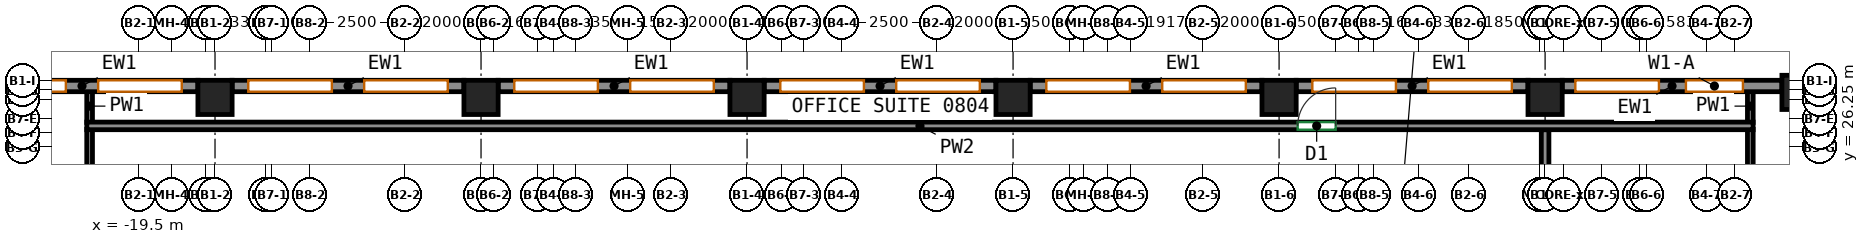
"""IFC4 building model, lengths in metres.
Left out: names, types, materials, properties, quantities, classifications, styles, units other than length and angle.
Written with IfcOpenShell. Run it as: python <this file> out.ifc"""

import sys

from ifc_helpers import new_model, si_unit, direction, frame, frame_2d, origin, origin_2d, place, context, subcontext, project, spatial, rectangle, extrude, source, transform, mapped, element, fill, save


model = new_model("IFC4")
c1 = context("Model", 3, precision=1e-05, world=origin(), true_north=direction((0.0, 1.0)))
c2 = subcontext(c1, "Body", "Model", "MODEL_VIEW")
j1 = project(units=[si_unit("LENGTHUNIT", "METRE"), si_unit("PLANEANGLEUNIT", "RADIAN")], contexts=[c1])
p1 = place(None, origin())
s1 = spatial("IfcSite", under=j1, at=p1, CompositionType="ELEMENT")
p2 = place(p1, origin())
s2 = spatial("IfcBuilding", under=s1, at=p2, CompositionType="ELEMENT")
p3 = place(p2, frame((0.0, 0.0, 39.0)))
s3 = spatial("IfcBuildingStorey", under=s2, at=p3, CompositionType="ELEMENT", Elevation=39.0)
m1 = source(origin(), c2, "Body", "SweptSolid", [
    extrude(rectangle(XDim=0.9, YDim=0.9, at=origin_2d()), origin(), (0.0, 0.0, 1.0), 3.72),
])
for number, where, z_axis, x_axis in (
    (1, (-17.5, 27.55, 0.0), (0.0, 0.0, 1.0), (1.0, 0.0, 0.0)),
    (2, (-10.5, 27.55, 0.0), (0.0, 0.0, 1.0), (1.0, 0.0, 0.0)),
    (3, (-3.5, 27.55, 0.0), (0.0, 0.0, 1.0), (1.0, 0.0, 0.0)),
    (4, (3.5, 27.55, 0.0), (0.0, 0.0, 1.0), (1.0, 0.0, 0.0)),
    (5, (10.5, 27.55, 0.0), (0.0, 0.0, 1.0), (1.0, 0.0, 0.0)),
    (6, (17.5, 27.55, 0.0), (0.0, 0.0, 1.0), (1.0, 0.0, 0.0)),
    (7, (24.182, 27.682, 0.0), (0.0, 0.0, 1.0), (1.0, 0.0, 0.0)),
):
    element("IfcColumn", number, at=place(p3, frame(where, z_axis=z_axis, x_axis=x_axis)), inside=s3, PredefinedType="COLUMN", context=c2, shape_type="MappedRepresentation", body=[
        mapped(m1, transform((0.0, 0.0, 0.0))),
    ])
m2 = source(origin(), c2, "Body", "SweptSolid", [
    extrude(rectangle(XDim=5.782, YDim=0.3, at=frame_2d((2.891, 0.0))), origin(), (0.0, 0.0, 1.0), 3.72),
])
p4 = place(p3, frame((23.732, 27.85, 0.0), z_axis=(0.0, 0.0, 1.0), x_axis=(-1.0, 0.0, 0.0)))
e8 = element("IfcWall", 8, at=p4, inside=s3, PredefinedType="SOLIDWALL", context=c2, shape_type="MappedRepresentation", body=[
    mapped(m2, transform((0.0, 0.0, 0.0))),
])
p5 = place(p4, frame((1.026, 0.0, 0.7)))
e9 = element("IfcOpeningElement", 9, at=p5, cuts=e8, PredefinedType="OPENING", context=c2, shape_type="SweptSolid", body=[
    extrude(rectangle(XDim=1.5, YDim=2.25, at=frame_2d((0.75, 1.125))), frame((0.0, 0.16, 0.0), z_axis=(0.0, -1.0, 0.0), x_axis=(1.0, 0.0, 0.0)), (0.0, 0.0, 1.0), 0.32),
])
p6 = place(p4, frame((3.236, 0.0, 0.7)))
e10 = element("IfcOpeningElement", 10, at=p6, cuts=e8, PredefinedType="OPENING", context=c2, shape_type="SweptSolid", body=[
    extrude(rectangle(XDim=2.2, YDim=2.25, at=frame_2d((1.1, 1.125))), frame((0.0, 0.16, 0.0), z_axis=(0.0, -1.0, 0.0), x_axis=(1.0, 0.0, 0.0)), (0.0, 0.0, 1.0), 0.32),
])
m3 = source(origin(), c2, "Body", "SweptSolid", [
    extrude(rectangle(XDim=6.1, YDim=0.3, at=frame_2d((3.05, 0.0))), origin(), (0.0, 0.0, 1.0), 3.72),
])
p7 = place(p3, frame((17.05, 27.85, 0.0), z_axis=(0.0, 0.0, 1.0), x_axis=(-1.0, 0.0, 0.0)))
e11 = element("IfcWall", 11, at=p7, inside=s3, PredefinedType="SOLIDWALL", context=c2, shape_type="MappedRepresentation", body=[
    mapped(m3, transform((0.0, 0.0, 0.0))),
])
p8 = place(p7, frame((0.425, 0.0, 0.7)))
e12 = element("IfcOpeningElement", 12, at=p8, cuts=e11, PredefinedType="OPENING", context=c2, shape_type="SweptSolid", body=[
    extrude(rectangle(XDim=2.2, YDim=2.25, at=frame_2d((1.1, 1.125))), frame((0.0, 0.16, 0.0), z_axis=(0.0, -1.0, 0.0), x_axis=(1.0, 0.0, 0.0)), (0.0, 0.0, 1.0), 0.32),
])
p9 = place(p7, frame((3.475, 0.0, 0.7)))
e13 = element("IfcOpeningElement", 13, at=p9, cuts=e11, PredefinedType="OPENING", context=c2, shape_type="SweptSolid", body=[
    extrude(rectangle(XDim=2.2, YDim=2.25, at=frame_2d((1.1, 1.125))), frame((0.0, 0.16, 0.0), z_axis=(0.0, -1.0, 0.0), x_axis=(1.0, 0.0, 0.0)), (0.0, 0.0, 1.0), 0.32),
])
p10 = place(p3, frame((10.05, 27.85, 0.0), z_axis=(0.0, 0.0, 1.0), x_axis=(-1.0, 0.0, 0.0)))
e14 = element("IfcWall", 14, at=p10, inside=s3, PredefinedType="SOLIDWALL", context=c2, shape_type="MappedRepresentation", body=[
    mapped(m3, transform((0.0, 0.0, 0.0))),
])
p11 = place(p10, frame((0.425, 0.0, 0.7)))
e15 = element("IfcOpeningElement", 15, at=p11, cuts=e14, PredefinedType="OPENING", context=c2, shape_type="SweptSolid", body=[
    extrude(rectangle(XDim=2.2, YDim=2.25, at=frame_2d((1.1, 1.125))), frame((0.0, 0.16, 0.0), z_axis=(0.0, -1.0, 0.0), x_axis=(1.0, 0.0, 0.0)), (0.0, 0.0, 1.0), 0.32),
])
p12 = place(p10, frame((3.475, 0.0, 0.7)))
e16 = element("IfcOpeningElement", 16, at=p12, cuts=e14, PredefinedType="OPENING", context=c2, shape_type="SweptSolid", body=[
    extrude(rectangle(XDim=2.2, YDim=2.25, at=frame_2d((1.1, 1.125))), frame((0.0, 0.16, 0.0), z_axis=(0.0, -1.0, 0.0), x_axis=(1.0, 0.0, 0.0)), (0.0, 0.0, 1.0), 0.32),
])
p13 = place(p3, frame((3.05, 27.85, 0.0), z_axis=(0.0, 0.0, 1.0), x_axis=(-1.0, 0.0, 0.0)))
e17 = element("IfcWall", 17, at=p13, inside=s3, PredefinedType="SOLIDWALL", context=c2, shape_type="MappedRepresentation", body=[
    mapped(m3, transform((0.0, 0.0, 0.0))),
])
p14 = place(p13, frame((0.425, 0.0, 0.7)))
e18 = element("IfcOpeningElement", 18, at=p14, cuts=e17, PredefinedType="OPENING", context=c2, shape_type="SweptSolid", body=[
    extrude(rectangle(XDim=2.2, YDim=2.25, at=frame_2d((1.1, 1.125))), frame((0.0, 0.16, 0.0), z_axis=(0.0, -1.0, 0.0), x_axis=(1.0, 0.0, 0.0)), (0.0, 0.0, 1.0), 0.32),
])
p15 = place(p13, frame((3.475, 0.0, 0.7)))
e19 = element("IfcOpeningElement", 19, at=p15, cuts=e17, PredefinedType="OPENING", context=c2, shape_type="SweptSolid", body=[
    extrude(rectangle(XDim=2.2, YDim=2.25, at=frame_2d((1.1, 1.125))), frame((0.0, 0.16, 0.0), z_axis=(0.0, -1.0, 0.0), x_axis=(1.0, 0.0, 0.0)), (0.0, 0.0, 1.0), 0.32),
])
p16 = place(p3, frame((-3.95, 27.85, 0.0), z_axis=(0.0, 0.0, 1.0), x_axis=(-1.0, 0.0, 0.0)))
e20 = element("IfcWall", 20, at=p16, inside=s3, PredefinedType="SOLIDWALL", context=c2, shape_type="MappedRepresentation", body=[
    mapped(m3, transform((0.0, 0.0, 0.0))),
])
p17 = place(p16, frame((0.425, 0.0, 0.7)))
e21 = element("IfcOpeningElement", 21, at=p17, cuts=e20, PredefinedType="OPENING", context=c2, shape_type="SweptSolid", body=[
    extrude(rectangle(XDim=2.2, YDim=2.25, at=frame_2d((1.1, 1.125))), frame((0.0, 0.16, 0.0), z_axis=(0.0, -1.0, 0.0), x_axis=(1.0, 0.0, 0.0)), (0.0, 0.0, 1.0), 0.32),
])
p18 = place(p16, frame((3.475, 0.0, 0.7)))
e22 = element("IfcOpeningElement", 22, at=p18, cuts=e20, PredefinedType="OPENING", context=c2, shape_type="SweptSolid", body=[
    extrude(rectangle(XDim=2.2, YDim=2.25, at=frame_2d((1.1, 1.125))), frame((0.0, 0.16, 0.0), z_axis=(0.0, -1.0, 0.0), x_axis=(1.0, 0.0, 0.0)), (0.0, 0.0, 1.0), 0.32),
])
p19 = place(p3, frame((-10.95, 27.85, 0.0), z_axis=(0.0, 0.0, 1.0), x_axis=(-1.0, 0.0, 0.0)))
e23 = element("IfcWall", 23, at=p19, inside=s3, PredefinedType="SOLIDWALL", context=c2, shape_type="MappedRepresentation", body=[
    mapped(m3, transform((0.0, 0.0, 0.0))),
])
p20 = place(p19, frame((0.425, 0.0, 0.7)))
e24 = element("IfcOpeningElement", 24, at=p20, cuts=e23, PredefinedType="OPENING", context=c2, shape_type="SweptSolid", body=[
    extrude(rectangle(XDim=2.2, YDim=2.25, at=frame_2d((1.1, 1.125))), frame((0.0, 0.16, 0.0), z_axis=(0.0, -1.0, 0.0), x_axis=(1.0, 0.0, 0.0)), (0.0, 0.0, 1.0), 0.32),
])
p21 = place(p19, frame((3.475, 0.0, 0.7)))
e25 = element("IfcOpeningElement", 25, at=p21, cuts=e23, PredefinedType="OPENING", context=c2, shape_type="SweptSolid", body=[
    extrude(rectangle(XDim=2.2, YDim=2.25, at=frame_2d((1.1, 1.125))), frame((0.0, 0.16, 0.0), z_axis=(0.0, -1.0, 0.0), x_axis=(1.0, 0.0, 0.0)), (0.0, 0.0, 1.0), 0.32),
])
p22 = place(p3, frame((-17.95, 27.85, 0.0), z_axis=(0.0, 0.0, 1.0), x_axis=(-1.0, 0.0, 0.0)))
e26 = element("IfcWall", 26, at=p22, inside=s3, PredefinedType="SOLIDWALL", context=c2, shape_type="MappedRepresentation", body=[
    mapped(m3, transform((0.0, 0.0, 0.0))),
])
p23 = place(p22, frame((0.425, 0.0, 0.7)))
e27 = element("IfcOpeningElement", 27, at=p23, cuts=e26, PredefinedType="OPENING", context=c2, shape_type="SweptSolid", body=[
    extrude(rectangle(XDim=2.2, YDim=2.25, at=frame_2d((1.1, 1.125))), frame((0.0, 0.16, 0.0), z_axis=(0.0, -1.0, 0.0), x_axis=(1.0, 0.0, 0.0)), (0.0, 0.0, 1.0), 0.32),
])
p24 = place(p22, frame((3.475, 0.0, 0.7)))
e28 = element("IfcOpeningElement", 28, at=p24, cuts=e26, PredefinedType="OPENING", context=c2, shape_type="SweptSolid", body=[
    extrude(rectangle(XDim=2.2, YDim=2.25, at=frame_2d((1.1, 1.125))), frame((0.0, 0.16, 0.0), z_axis=(0.0, -1.0, 0.0), x_axis=(1.0, 0.0, 0.0)), (0.0, 0.0, 1.0), 0.32),
])
p25 = place(p3, frame((-20.8, 3.275, 0.0), z_axis=(0.0, 0.0, 1.0), x_axis=(0.0, 1.0, 0.0)))
e29 = element("IfcWall", 29, at=p25, inside=s3, PredefinedType="PARTITIONING", context=c2, shape_type="SweptSolid", body=[
    extrude(rectangle(XDim=23.435, YDim=0.15, at=frame_2d((11.718, 0.0))), origin(), (0.0, 0.0, 1.0), 3.72),
])
p26 = place(p25, frame((6.31, 0.0, 0.0)))
e30 = element("IfcOpeningElement", 30, at=p26, cuts=e29, PredefinedType="OPENING", context=c2, shape_type="SweptSolid", body=[
    extrude(rectangle(XDim=0.9, YDim=2.1, at=frame_2d((0.45, 1.05))), frame((0.0, 0.085, 0.0), z_axis=(0.0, -1.0, 0.0), x_axis=(1.0, 0.0, 0.0)), (0.0, 0.0, 1.0), 0.17),
])
p27 = place(p3, frame((22.9, 3.275, 0.0), z_axis=(0.0, 0.0, 1.0), x_axis=(0.0, 1.0, 0.0)))
e31 = element("IfcWall", 31, at=p27, inside=s3, PredefinedType="PARTITIONING", context=c2, shape_type="SweptSolid", body=[
    extrude(rectangle(XDim=23.435, YDim=0.15, at=frame_2d((11.718, 0.0))), origin(), (0.0, 0.0, 1.0), 3.72),
])
p28 = place(p27, frame((5.008, 0.0, 0.0)))
e32 = element("IfcOpeningElement", 32, at=p28, cuts=e31, PredefinedType="OPENING", context=c2, shape_type="SweptSolid", body=[
    extrude(rectangle(XDim=0.9, YDim=2.1, at=frame_2d((0.45, 1.05))), frame((0.0, 0.085, 0.0), z_axis=(0.0, -1.0, 0.0), x_axis=(1.0, 0.0, 0.0)), (0.0, 0.0, 1.0), 0.17),
])
for number, where, z_axis, x_axis in (
    (33, (-20.8, 26.891, 0.0), (0.0, 0.0, 1.0), (0.0, 1.0, 0.0)),
    (34, (22.9, 26.891, 0.0), (0.0, 0.0, 1.0), (0.0, 1.0, 0.0)),
):
    element("IfcWall", number, at=place(p3, frame(where, z_axis=z_axis, x_axis=x_axis)), inside=s3, PredefinedType="PARTITIONING", context=c2, shape_type="SweptSolid", body=[
        extrude(rectangle(XDim=0.859, YDim=0.15, at=frame_2d((0.429, 0.0))), origin(), (0.0, 0.0, 1.0), 3.72),
    ])
p29 = place(p3, frame((17.5, 22.0, 0.0), z_axis=(0.0, 0.0, 1.0), x_axis=(0.0, 1.0, 0.0)))
e35 = element("IfcWall", 35, at=p29, inside=s3, PredefinedType="PARTITIONING", context=c2, shape_type="SweptSolid", body=[
    extrude(rectangle(XDim=4.7, YDim=0.2, at=frame_2d((2.35, 0.0))), origin(), (0.0, 0.0, 1.0), 3.72),
])
p30 = place(p3, frame((-20.874, 26.8, 0.0), z_axis=(0.0, 0.0, 1.0), x_axis=(1.0, 0.0, 0.0)))
e36 = element("IfcWall", 36, at=p30, inside=s3, PredefinedType="PARTITIONING", context=c2, shape_type="SweptSolid", body=[
    extrude(rectangle(XDim=43.848, YDim=0.2, at=frame_2d((21.924, 0.0))), origin(), (0.0, 0.0, 1.0), 3.72),
])
p31 = place(p30, frame((31.863, 0.0, 0.0)))
e37 = element("IfcOpeningElement", 37, at=p31, cuts=e36, PredefinedType="OPENING", context=c2, shape_type="SweptSolid", body=[
    extrude(rectangle(XDim=1.0, YDim=2.1, at=frame_2d((0.5, 1.05))), frame((0.0, 0.11, 0.0), z_axis=(0.0, -1.0, 0.0), x_axis=(1.0, 0.0, 0.0)), (0.0, 0.0, 1.0), 0.22),
])
p32 = place(p5, origin())
e38 = element("IfcWindow", 38, at=p32, inside=s3, PartitioningType="SINGLE_PANEL", PredefinedType="WINDOW", context=c2, shape_type="SweptSolid", body=[
    extrude(rectangle(XDim=1.5, YDim=2.25, at=frame_2d((0.75, 1.125))), frame((0.0, 0.03, 0.0), z_axis=(0.0, -1.0, 0.0), x_axis=(1.0, 0.0, 0.0)), (0.0, 0.0, 1.0), 0.06),
])
fill(e9, e38)
p33 = place(p6, origin())
e39 = element("IfcWindow", 39, at=p33, inside=s3, PartitioningType="SINGLE_PANEL", PredefinedType="WINDOW", context=c2, shape_type="SweptSolid", body=[
    extrude(rectangle(XDim=2.2, YDim=2.25, at=frame_2d((1.1, 1.125))), frame((0.0, 0.03, 0.0), z_axis=(0.0, -1.0, 0.0), x_axis=(1.0, 0.0, 0.0)), (0.0, 0.0, 1.0), 0.06),
])
fill(e10, e39)
p34 = place(p8, origin())
e40 = element("IfcWindow", 40, at=p34, inside=s3, PartitioningType="SINGLE_PANEL", PredefinedType="WINDOW", context=c2, shape_type="SweptSolid", body=[
    extrude(rectangle(XDim=2.2, YDim=2.25, at=frame_2d((1.1, 1.125))), frame((0.0, 0.03, 0.0), z_axis=(0.0, -1.0, 0.0), x_axis=(1.0, 0.0, 0.0)), (0.0, 0.0, 1.0), 0.06),
])
fill(e12, e40)
p35 = place(p9, origin())
e41 = element("IfcWindow", 41, at=p35, inside=s3, PartitioningType="SINGLE_PANEL", PredefinedType="WINDOW", context=c2, shape_type="SweptSolid", body=[
    extrude(rectangle(XDim=2.2, YDim=2.25, at=frame_2d((1.1, 1.125))), frame((0.0, 0.03, 0.0), z_axis=(0.0, -1.0, 0.0), x_axis=(1.0, 0.0, 0.0)), (0.0, 0.0, 1.0), 0.06),
])
fill(e13, e41)
p36 = place(p11, origin())
e42 = element("IfcWindow", 42, at=p36, inside=s3, PartitioningType="SINGLE_PANEL", PredefinedType="WINDOW", context=c2, shape_type="SweptSolid", body=[
    extrude(rectangle(XDim=2.2, YDim=2.25, at=frame_2d((1.1, 1.125))), frame((0.0, 0.03, 0.0), z_axis=(0.0, -1.0, 0.0), x_axis=(1.0, 0.0, 0.0)), (0.0, 0.0, 1.0), 0.06),
])
fill(e15, e42)
p37 = place(p12, origin())
e43 = element("IfcWindow", 43, at=p37, inside=s3, PartitioningType="SINGLE_PANEL", PredefinedType="WINDOW", context=c2, shape_type="SweptSolid", body=[
    extrude(rectangle(XDim=2.2, YDim=2.25, at=frame_2d((1.1, 1.125))), frame((0.0, 0.03, 0.0), z_axis=(0.0, -1.0, 0.0), x_axis=(1.0, 0.0, 0.0)), (0.0, 0.0, 1.0), 0.06),
])
fill(e16, e43)
p38 = place(p14, origin())
e44 = element("IfcWindow", 44, at=p38, inside=s3, PartitioningType="SINGLE_PANEL", PredefinedType="WINDOW", context=c2, shape_type="SweptSolid", body=[
    extrude(rectangle(XDim=2.2, YDim=2.25, at=frame_2d((1.1, 1.125))), frame((0.0, 0.03, 0.0), z_axis=(0.0, -1.0, 0.0), x_axis=(1.0, 0.0, 0.0)), (0.0, 0.0, 1.0), 0.06),
])
fill(e18, e44)
p39 = place(p15, origin())
e45 = element("IfcWindow", 45, at=p39, inside=s3, PartitioningType="SINGLE_PANEL", PredefinedType="WINDOW", context=c2, shape_type="SweptSolid", body=[
    extrude(rectangle(XDim=2.2, YDim=2.25, at=frame_2d((1.1, 1.125))), frame((0.0, 0.03, 0.0), z_axis=(0.0, -1.0, 0.0), x_axis=(1.0, 0.0, 0.0)), (0.0, 0.0, 1.0), 0.06),
])
fill(e19, e45)
p40 = place(p17, origin())
e46 = element("IfcWindow", 46, at=p40, inside=s3, PartitioningType="SINGLE_PANEL", PredefinedType="WINDOW", context=c2, shape_type="SweptSolid", body=[
    extrude(rectangle(XDim=2.2, YDim=2.25, at=frame_2d((1.1, 1.125))), frame((0.0, 0.03, 0.0), z_axis=(0.0, -1.0, 0.0), x_axis=(1.0, 0.0, 0.0)), (0.0, 0.0, 1.0), 0.06),
])
fill(e21, e46)
p41 = place(p18, origin())
e47 = element("IfcWindow", 47, at=p41, inside=s3, PartitioningType="SINGLE_PANEL", PredefinedType="WINDOW", context=c2, shape_type="SweptSolid", body=[
    extrude(rectangle(XDim=2.2, YDim=2.25, at=frame_2d((1.1, 1.125))), frame((0.0, 0.03, 0.0), z_axis=(0.0, -1.0, 0.0), x_axis=(1.0, 0.0, 0.0)), (0.0, 0.0, 1.0), 0.06),
])
fill(e22, e47)
p42 = place(p20, origin())
e48 = element("IfcWindow", 48, at=p42, inside=s3, PartitioningType="SINGLE_PANEL", PredefinedType="WINDOW", context=c2, shape_type="SweptSolid", body=[
    extrude(rectangle(XDim=2.2, YDim=2.25, at=frame_2d((1.1, 1.125))), frame((0.0, 0.03, 0.0), z_axis=(0.0, -1.0, 0.0), x_axis=(1.0, 0.0, 0.0)), (0.0, 0.0, 1.0), 0.06),
])
fill(e24, e48)
p43 = place(p21, origin())
e49 = element("IfcWindow", 49, at=p43, inside=s3, PartitioningType="SINGLE_PANEL", PredefinedType="WINDOW", context=c2, shape_type="SweptSolid", body=[
    extrude(rectangle(XDim=2.2, YDim=2.25, at=frame_2d((1.1, 1.125))), frame((0.0, 0.03, 0.0), z_axis=(0.0, -1.0, 0.0), x_axis=(1.0, 0.0, 0.0)), (0.0, 0.0, 1.0), 0.06),
])
fill(e25, e49)
p44 = place(p23, origin())
e50 = element("IfcWindow", 50, at=p44, inside=s3, PartitioningType="SINGLE_PANEL", PredefinedType="WINDOW", context=c2, shape_type="SweptSolid", body=[
    extrude(rectangle(XDim=2.2, YDim=2.25, at=frame_2d((1.1, 1.125))), frame((0.0, 0.03, 0.0), z_axis=(0.0, -1.0, 0.0), x_axis=(1.0, 0.0, 0.0)), (0.0, 0.0, 1.0), 0.06),
])
fill(e27, e50)
p45 = place(p24, origin())
e51 = element("IfcWindow", 51, at=p45, inside=s3, PartitioningType="SINGLE_PANEL", PredefinedType="WINDOW", context=c2, shape_type="SweptSolid", body=[
    extrude(rectangle(XDim=2.2, YDim=2.25, at=frame_2d((1.1, 1.125))), frame((0.0, 0.03, 0.0), z_axis=(0.0, -1.0, 0.0), x_axis=(1.0, 0.0, 0.0)), (0.0, 0.0, 1.0), 0.06),
])
fill(e28, e51)
p46 = place(p31, origin())
e52 = element("IfcDoor", 52, at=p46, inside=s3, OperationType="SINGLE_SWING_RIGHT", PredefinedType="DOOR", context=c2, shape_type="SweptSolid", body=[
    extrude(rectangle(XDim=1.0, YDim=2.1, at=frame_2d((0.5, 1.05))), frame((0.0, 0.025, 0.0), z_axis=(0.0, -1.0, 0.0), x_axis=(1.0, 0.0, 0.0)), (0.0, 0.0, 1.0), 0.05),
])
fill(e37, e52)
save(model, sys.argv[1])
